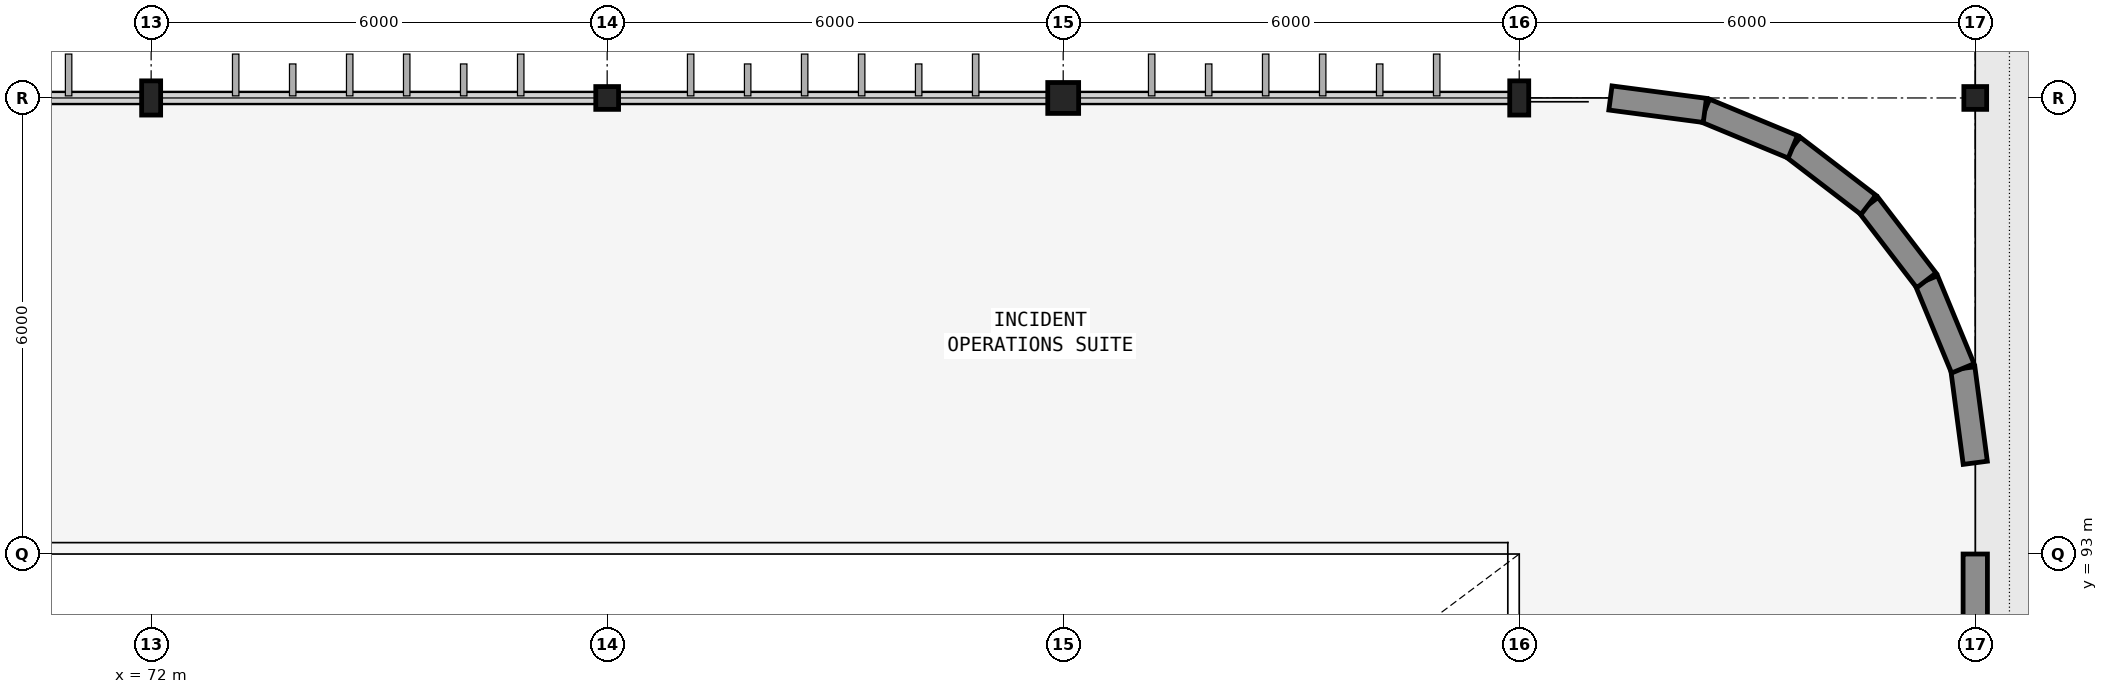
"""IFC4 building model, lengths in metres.
Left out: names, types, materials, properties, quantities, classifications, styles, units other than length and angle.
Written with IfcOpenShell. Run it as: python <this file> out.ifc"""

import sys

from ifc_helpers import new_model, si_unit, direction, frame, frame_2d, origin, origin_2d, place, context, subcontext, project, spatial, rectangle, hollow_rectangle, hollow_circle, i_section, extrude, element, save


model = new_model("IFC4")
c1 = context("Model", 3, precision=1e-05, world=origin(), true_north=direction((0.0, 1.0)))
c2 = subcontext(c1, "Body", "Model", "MODEL_VIEW")
j1 = project(units=[si_unit("LENGTHUNIT", "METRE"), si_unit("PLANEANGLEUNIT", "RADIAN")], contexts=[c1])
p1 = place(None, origin())
s1 = spatial("IfcSite", under=j1, at=p1, CompositionType="ELEMENT")
p2 = place(p1, origin())
s2 = spatial("IfcBuilding", under=s1, at=p2, CompositionType="ELEMENT")
p3 = place(p2, frame((0.0, 0.0, 18.0)))
s3 = spatial("IfcBuildingStorey", under=s2, at=p3, CompositionType="ELEMENT", Elevation=18.0)
p4 = place(p3, frame((72.0, 99.0, 0.0), z_axis=(0.0, 0.0, 1.0), x_axis=(1.0, 0.0, 0.0)))
e1 = element("IfcColumn", 1, at=p4, inside=s3, PredefinedType="COLUMN", context=c2, shape_type="SweptSolid", body=[
    extrude(i_section(OverallWidth=0.25, OverallDepth=0.45, WebThickness=0.011, FlangeThickness=0.014, FilletRadius=0.015, at=origin_2d()), origin(), (0.0, 0.0, 1.0), 4.2),
])
p5 = place(p3, frame((78.0, 99.0, 0.0), z_axis=(0.0, 0.0, 1.0), x_axis=(1.0, 0.0, 0.0)))
e2 = element("IfcColumn", 2, at=p5, inside=s3, PredefinedType="COLUMN", context=c2, shape_type="SweptSolid", body=[
    extrude(hollow_rectangle(XDim=0.3, YDim=0.3, WallThickness=0.016, InnerFilletRadius=0.016, OuterFilletRadius=0.032, at=origin_2d()), origin(), (0.0, 0.0, 1.0), 4.2),
])
p6 = place(p3, frame((84.0, 99.0, 0.0), z_axis=(0.0, 0.0, 1.0), x_axis=(1.0, 0.0, 0.0)))
e3 = element("IfcColumn", 3, at=p6, inside=s3, PredefinedType="COLUMN", context=c2, shape_type="SweptSolid", body=[
    extrude(hollow_circle(Radius=0.203, WallThickness=0.016, at=origin_2d()), origin(), (0.0, 0.0, 1.0), 4.2),
])
p7 = place(p3, frame((90.0, 99.0, 0.0), z_axis=(0.0, 0.0, 1.0), x_axis=(1.0, 0.0, 0.0)))
e4 = element("IfcColumn", 4, at=p7, inside=s3, PredefinedType="COLUMN", context=c2, shape_type="SweptSolid", body=[
    extrude(i_section(OverallWidth=0.25, OverallDepth=0.45, WebThickness=0.011, FlangeThickness=0.014, FilletRadius=0.015, at=origin_2d()), origin(), (0.0, 0.0, 1.0), 4.2),
])
p8 = place(p3, frame((96.0, 99.0, 0.0), z_axis=(0.0, 0.0, 1.0), x_axis=(1.0, 0.0, 0.0)))
e5 = element("IfcColumn", 5, at=p8, inside=s3, PredefinedType="COLUMN", context=c2, shape_type="SweptSolid", body=[
    extrude(hollow_rectangle(XDim=0.3, YDim=0.3, WallThickness=0.016, InnerFilletRadius=0.016, OuterFilletRadius=0.032, at=origin_2d()), origin(), (0.0, 0.0, 1.0), 4.2),
])
p9 = place(p3, frame((96.0, 87.207, 0.0), z_axis=(0.0, 0.0, 1.0), x_axis=(0.0, 1.0, 0.0)))
e6 = element("IfcWall", 6, at=p9, inside=s3, PredefinedType="SOLIDWALL", context=c2, shape_type="SweptSolid", body=[
    extrude(rectangle(XDim=5.793, YDim=0.32, at=frame_2d((2.896, 0.0))), origin(), (0.0, 0.0, 1.0), 3.09),
])
p10 = place(p9, frame((1.996, 0.0, 1.1)))
e7 = element("IfcOpeningElement", 7, at=p10, cuts=e6, PredefinedType="OPENING", context=c2, shape_type="SweptSolid", body=[
    extrude(rectangle(XDim=1.8, YDim=1.2, at=frame_2d((0.9, 0.6))), frame((0.0, 0.17, 0.0), z_axis=(0.0, -1.0, 0.0), x_axis=(1.0, 0.0, 0.0)), (0.0, 0.0, 1.0), 0.34),
])
for number, where, z_axis, x_axis in (
    (8, (96.0, 94.2, 0.0), (0.0, 0.0, 1.0), (-0.131, 0.991, 0.0)),
    (9, (95.836, 95.442, 0.0), (0.0, 0.0, 1.0), (-0.383, 0.924, 0.0)),
):
    element("IfcWall", number, at=place(p3, frame(where, z_axis=z_axis, x_axis=x_axis)), inside=s3, PredefinedType="SOLIDWALL", context=c2, shape_type="SweptSolid", body=[
        extrude(rectangle(XDim=1.253, YDim=0.32, at=frame_2d((0.626, 0.0))), origin(), (0.0, 0.0, 1.0), 3.09),
    ])
for number, where, z_axis, x_axis in (
    (10, (95.357, 96.6, 0.0), (0.0, 0.0, 1.0), (-0.609, 0.793, 0.0)),
    (11, (94.594, 97.594, 0.0), (0.0, 0.0, 1.0), (-0.793, 0.609, 0.0)),
):
    element("IfcWall", number, at=place(p3, frame(where, z_axis=z_axis, x_axis=x_axis)), inside=s3, PredefinedType="SOLIDWALL", context=c2, shape_type="SweptSolid", body=[
        extrude(rectangle(XDim=1.253, YDim=0.32, at=frame_2d((0.626, 0.0))), origin(), (0.0, 0.0, 1.0), 3.895),
    ])
for number, where, z_axis, x_axis in (
    (12, (93.6, 98.357, 0.0), (0.0, 0.0, 1.0), (-0.924, 0.383, 0.0)),
    (13, (92.442, 98.836, 0.0), (0.0, 0.0, 1.0), (-0.991, 0.131, 0.0)),
):
    element("IfcWall", number, at=place(p3, frame(where, z_axis=z_axis, x_axis=x_axis)), inside=s3, PredefinedType="SOLIDWALL", context=c2, shape_type="SweptSolid", body=[
        extrude(rectangle(XDim=1.253, YDim=0.32, at=frame_2d((0.626, 0.0))), origin(), (0.0, 0.0, 1.0), 3.59),
    ])
save(model, sys.argv[1])
